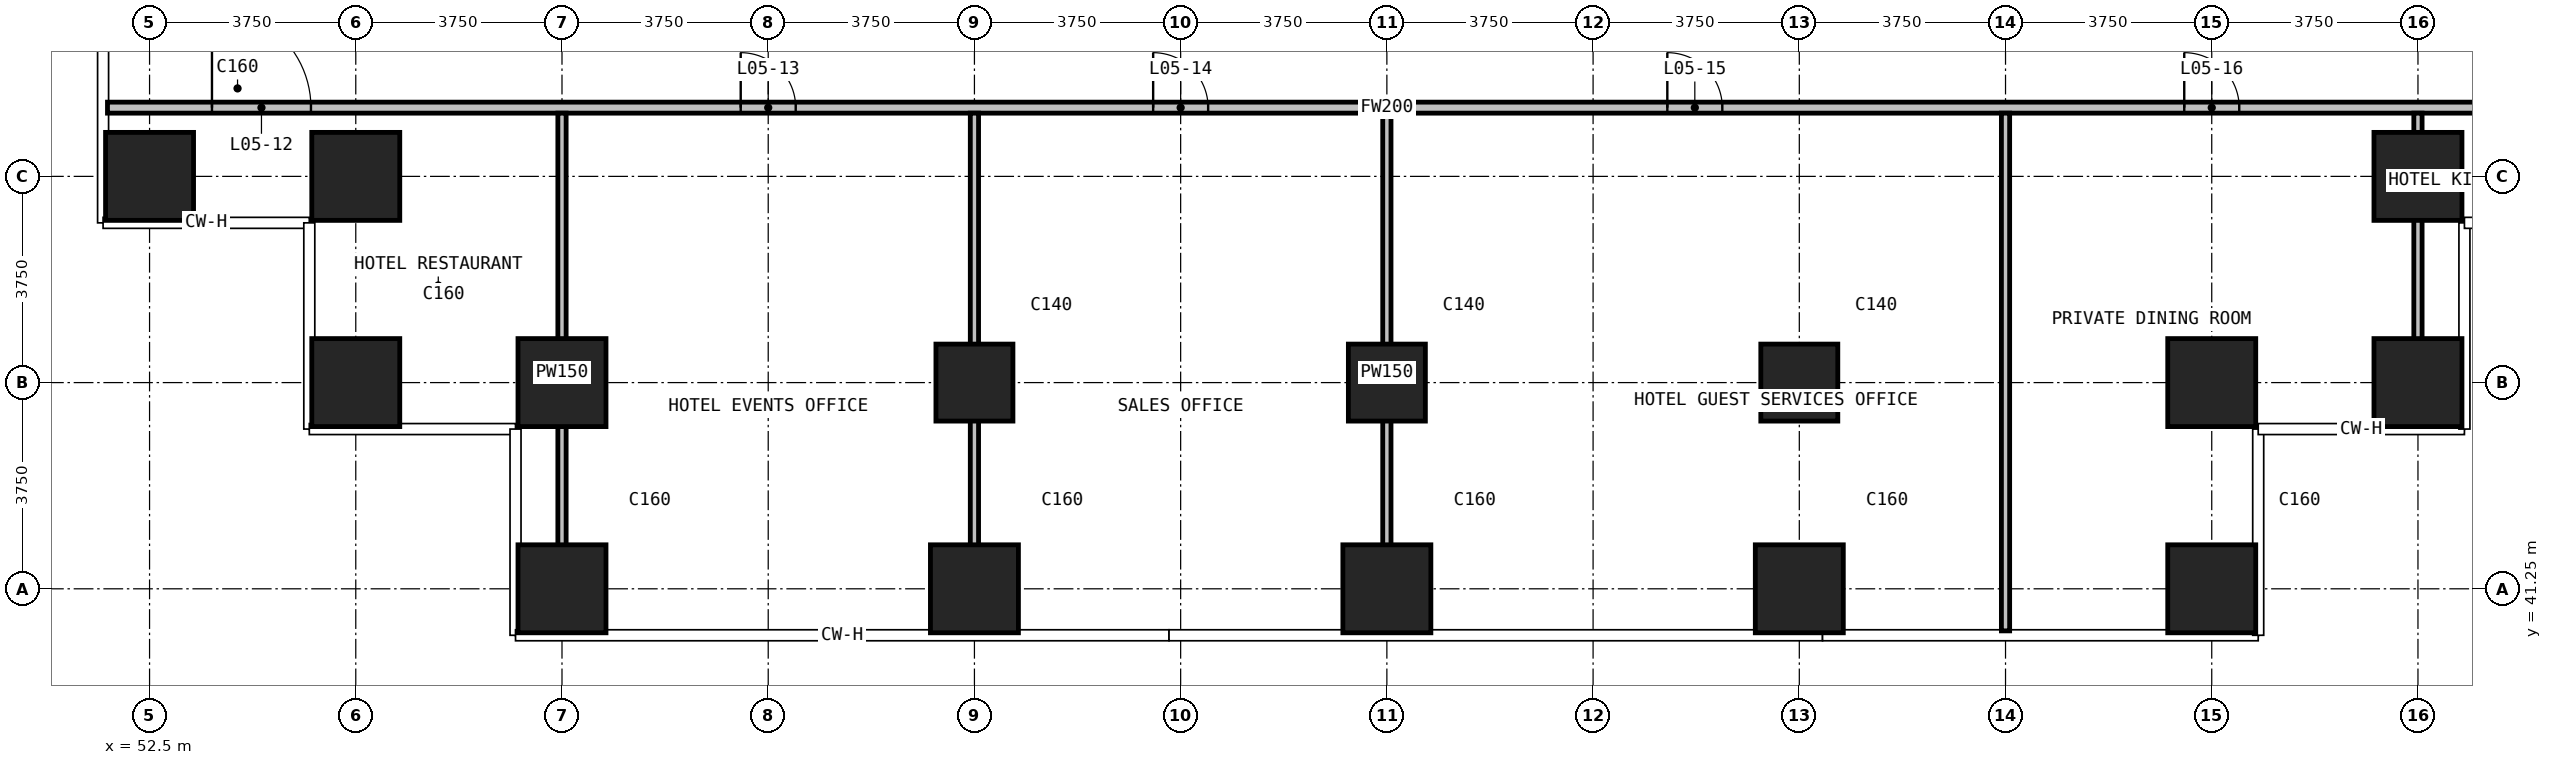
"""IFC4 building model, lengths in metres.
Left out: names, types, materials, properties, quantities, classifications, styles, units other than length and angle.
Written with IfcOpenShell. Run it as: python <this file> out.ifc"""

import sys

from ifc_helpers import new_model, si_unit, direction, frame, frame_2d, origin, origin_2d, place, context, subcontext, project, spatial, rectangle, extrude, element, fill, save


model = new_model("IFC4")
c1 = context("Model", 3, precision=1e-05, world=origin(), true_north=direction((0.0, 1.0)))
c2 = subcontext(c1, "Body", "Model", "MODEL_VIEW")
j1 = project(units=[si_unit("LENGTHUNIT", "METRE"), si_unit("PLANEANGLEUNIT", "RADIAN")], contexts=[c1])
p1 = place(None, origin())
s1 = spatial("IfcSite", under=j1, at=p1, CompositionType="ELEMENT")
p2 = place(p1, origin())
s2 = spatial("IfcBuilding", under=s1, at=p2, CompositionType="ELEMENT")
p3 = place(p2, frame((0.0, 0.0, 35.0)))
s3 = spatial("IfcBuildingStorey", under=s2, at=p3, CompositionType="ELEMENT", Elevation=35.0)
for number, where, z_axis, x_axis in (
    (1, (52.5, 48.75, 0.0), (0.0, 0.0, 1.0), (1.0, 0.0, 0.0)),
    (2, (56.25, 45.0, 0.0), (0.0, 0.0, 1.0), (1.0, 0.0, 0.0)),
    (3, (56.25, 48.75, 0.0), (0.0, 0.0, 1.0), (1.0, 0.0, 0.0)),
    (4, (60.0, 41.25, 0.0), (0.0, 0.0, 1.0), (1.0, 0.0, 0.0)),
    (5, (60.0, 45.0, 0.0), (0.0, 0.0, 1.0), (1.0, 0.0, 0.0)),
    (6, (67.5, 41.25, 0.0), (0.0, 0.0, 1.0), (1.0, 0.0, 0.0)),
):
    element("IfcColumn", number, at=place(p3, frame(where, z_axis=z_axis, x_axis=x_axis)), inside=s3, PredefinedType="COLUMN", context=c2, shape_type="SweptSolid", body=[
        extrude(rectangle(XDim=1.6, YDim=1.6, at=origin_2d()), origin(), (0.0, 0.0, 1.0), 4.5),
    ])
p4 = place(p3, frame((67.5, 45.0, 0.0), z_axis=(0.0, 0.0, 1.0), x_axis=(1.0, 0.0, 0.0)))
e7 = element("IfcColumn", 7, at=p4, inside=s3, PredefinedType="COLUMN", context=c2, shape_type="SweptSolid", body=[
    extrude(rectangle(XDim=1.4, YDim=1.4, at=origin_2d()), origin(), (0.0, 0.0, 1.0), 4.5),
])
p5 = place(p3, frame((75.0, 41.25, 0.0), z_axis=(0.0, 0.0, 1.0), x_axis=(1.0, 0.0, 0.0)))
e8 = element("IfcColumn", 8, at=p5, inside=s3, PredefinedType="COLUMN", context=c2, shape_type="SweptSolid", body=[
    extrude(rectangle(XDim=1.6, YDim=1.6, at=origin_2d()), origin(), (0.0, 0.0, 1.0), 4.5),
])
p6 = place(p3, frame((75.0, 45.0, 0.0), z_axis=(0.0, 0.0, 1.0), x_axis=(1.0, 0.0, 0.0)))
e9 = element("IfcColumn", 9, at=p6, inside=s3, PredefinedType="COLUMN", context=c2, shape_type="SweptSolid", body=[
    extrude(rectangle(XDim=1.4, YDim=1.4, at=origin_2d()), origin(), (0.0, 0.0, 1.0), 4.5),
])
p7 = place(p3, frame((82.5, 41.25, 0.0), z_axis=(0.0, 0.0, 1.0), x_axis=(1.0, 0.0, 0.0)))
e10 = element("IfcColumn", 10, at=p7, inside=s3, PredefinedType="COLUMN", context=c2, shape_type="SweptSolid", body=[
    extrude(rectangle(XDim=1.6, YDim=1.6, at=origin_2d()), origin(), (0.0, 0.0, 1.0), 4.5),
])
p8 = place(p3, frame((82.5, 45.0, 0.0), z_axis=(0.0, 0.0, 1.0), x_axis=(1.0, 0.0, 0.0)))
e11 = element("IfcColumn", 11, at=p8, inside=s3, PredefinedType="COLUMN", context=c2, shape_type="SweptSolid", body=[
    extrude(rectangle(XDim=1.4, YDim=1.4, at=origin_2d()), origin(), (0.0, 0.0, 1.0), 4.5),
])
for number, where, z_axis, x_axis in (
    (12, (90.0, 41.25, 0.0), (0.0, 0.0, 1.0), (1.0, 0.0, 0.0)),
    (13, (90.0, 45.0, 0.0), (0.0, 0.0, 1.0), (1.0, 0.0, 0.0)),
    (14, (93.75, 45.0, 0.0), (0.0, 0.0, 1.0), (1.0, 0.0, 0.0)),
    (15, (93.75, 48.75, 0.0), (0.0, 0.0, 1.0), (1.0, 0.0, 0.0)),
):
    element("IfcColumn", number, at=place(p3, frame(where, z_axis=z_axis, x_axis=x_axis)), inside=s3, PredefinedType="COLUMN", context=c2, shape_type="SweptSolid", body=[
        extrude(rectangle(XDim=1.6, YDim=1.6, at=origin_2d()), origin(), (0.0, 0.0, 1.0), 4.5),
    ])
p9 = place(p3, frame((51.735, 50.0, 0.0), z_axis=(0.0, 0.0, 1.0), x_axis=(1.0, 0.0, 0.0)))
e16 = element("IfcWall", 16, at=p9, inside=s3, PredefinedType="PARTITIONING", context=c2, shape_type="SweptSolid", body=[
    extrude(rectangle(XDim=46.53, YDim=0.2, at=frame_2d((23.265, 0.0))), origin(), (0.0, 0.0, 1.0), 4.2),
])
p10 = place(p9, frame((1.9, 0.0, 0.0)))
e17 = element("IfcOpeningElement", 17, at=p10, cuts=e16, PredefinedType="OPENING", context=c2, shape_type="SweptSolid", body=[
    extrude(rectangle(XDim=1.8, YDim=2.2, at=frame_2d((0.9, 1.1))), frame((0.0, 0.11, 0.0), z_axis=(0.0, -1.0, 0.0), x_axis=(1.0, 0.0, 0.0)), (0.0, 0.0, 1.0), 0.22),
])
p11 = place(p9, frame((11.515, 0.0, 0.0)))
e18 = element("IfcOpeningElement", 18, at=p11, cuts=e16, PredefinedType="OPENING", context=c2, shape_type="SweptSolid", body=[
    extrude(rectangle(XDim=1.0, YDim=2.2, at=frame_2d((0.5, 1.1))), frame((0.0, 0.11, 0.0), z_axis=(0.0, -1.0, 0.0), x_axis=(1.0, 0.0, 0.0)), (0.0, 0.0, 1.0), 0.22),
])
p12 = place(p9, frame((19.015, 0.0, 0.0)))
e19 = element("IfcOpeningElement", 19, at=p12, cuts=e16, PredefinedType="OPENING", context=c2, shape_type="SweptSolid", body=[
    extrude(rectangle(XDim=1.0, YDim=2.2, at=frame_2d((0.5, 1.1))), frame((0.0, 0.11, 0.0), z_axis=(0.0, -1.0, 0.0), x_axis=(1.0, 0.0, 0.0)), (0.0, 0.0, 1.0), 0.22),
])
p13 = place(p9, frame((28.365, 0.0, 0.0)))
e20 = element("IfcOpeningElement", 20, at=p13, cuts=e16, PredefinedType="OPENING", context=c2, shape_type="SweptSolid", body=[
    extrude(rectangle(XDim=1.0, YDim=2.2, at=frame_2d((0.5, 1.1))), frame((0.0, 0.11, 0.0), z_axis=(0.0, -1.0, 0.0), x_axis=(1.0, 0.0, 0.0)), (0.0, 0.0, 1.0), 0.22),
])
p14 = place(p9, frame((37.765, 0.0, 0.0)))
e21 = element("IfcOpeningElement", 21, at=p14, cuts=e16, PredefinedType="OPENING", context=c2, shape_type="SweptSolid", body=[
    extrude(rectangle(XDim=1.0, YDim=2.2, at=frame_2d((0.5, 1.1))), frame((0.0, 0.11, 0.0), z_axis=(0.0, -1.0, 0.0), x_axis=(1.0, 0.0, 0.0)), (0.0, 0.0, 1.0), 0.22),
])
p15 = place(p9, frame((43.815, 0.0, 0.0)))
e22 = element("IfcOpeningElement", 22, at=p15, cuts=e16, PredefinedType="OPENING", context=c2, shape_type="SweptSolid", body=[
    extrude(rectangle(XDim=0.9, YDim=2.2, at=frame_2d((0.45, 1.1))), frame((0.0, 0.11, 0.0), z_axis=(0.0, -1.0, 0.0), x_axis=(1.0, 0.0, 0.0)), (0.0, 0.0, 1.0), 0.22),
])
for number, where, z_axis, x_axis in (
    (23, (60.0, 40.485, 0.0), (0.0, 0.0, 1.0), (0.0, 1.0, 0.0)),
    (24, (67.5, 40.485, 0.0), (0.0, 0.0, 1.0), (0.0, 1.0, 0.0)),
    (25, (75.0, 40.485, 0.0), (0.0, 0.0, 1.0), (0.0, 1.0, 0.0)),
    (26, (86.25, 40.485, 0.0), (0.0, 0.0, 1.0), (0.0, 1.0, 0.0)),
):
    element("IfcWall", number, at=place(p3, frame(where, z_axis=z_axis, x_axis=x_axis)), inside=s3, PredefinedType="PARTITIONING", context=c2, shape_type="SweptSolid", body=[
        extrude(rectangle(XDim=9.415, YDim=0.15, at=frame_2d((4.708, 0.0))), origin(), (0.0, 0.0, 1.0), 4.2),
    ])
p16 = place(p3, frame((93.75, 44.235, 0.0), z_axis=(0.0, 0.0, 1.0), x_axis=(0.0, 1.0, 0.0)))
e27 = element("IfcWall", 27, at=p16, inside=s3, PredefinedType="PARTITIONING", context=c2, shape_type="SweptSolid", body=[
    extrude(rectangle(XDim=5.665, YDim=0.15, at=frame_2d((2.833, 0.0))), origin(), (0.0, 0.0, 1.0), 4.2),
])
p17 = place(p10, origin())
e28 = element("IfcDoor", 28, at=p17, inside=s3, OperationType="DOUBLE_DOOR_SINGLE_SWING", PredefinedType="DOOR", context=c2, shape_type="SweptSolid", body=[
    extrude(rectangle(XDim=1.8, YDim=2.2, at=frame_2d((0.9, 1.1))), frame((0.0, 0.025, 0.0), z_axis=(0.0, -1.0, 0.0), x_axis=(1.0, 0.0, 0.0)), (0.0, 0.0, 1.0), 0.05),
])
fill(e17, e28)
p18 = place(p11, origin())
e29 = element("IfcDoor", 29, at=p18, inside=s3, OperationType="SINGLE_SWING_RIGHT", PredefinedType="DOOR", context=c2, shape_type="SweptSolid", body=[
    extrude(rectangle(XDim=1.0, YDim=2.2, at=frame_2d((0.5, 1.1))), frame((0.0, 0.025, 0.0), z_axis=(0.0, -1.0, 0.0), x_axis=(1.0, 0.0, 0.0)), (0.0, 0.0, 1.0), 0.05),
])
fill(e18, e29)
p19 = place(p12, origin())
e30 = element("IfcDoor", 30, at=p19, inside=s3, OperationType="SINGLE_SWING_RIGHT", PredefinedType="DOOR", context=c2, shape_type="SweptSolid", body=[
    extrude(rectangle(XDim=1.0, YDim=2.2, at=frame_2d((0.5, 1.1))), frame((0.0, 0.025, 0.0), z_axis=(0.0, -1.0, 0.0), x_axis=(1.0, 0.0, 0.0)), (0.0, 0.0, 1.0), 0.05),
])
fill(e19, e30)
p20 = place(p13, origin())
e31 = element("IfcDoor", 31, at=p20, inside=s3, OperationType="SINGLE_SWING_LEFT", PredefinedType="DOOR", context=c2, shape_type="SweptSolid", body=[
    extrude(rectangle(XDim=1.0, YDim=2.2, at=frame_2d((0.5, 1.1))), frame((0.0, 0.025, 0.0), z_axis=(0.0, -1.0, 0.0), x_axis=(1.0, 0.0, 0.0)), (0.0, 0.0, 1.0), 0.05),
])
fill(e20, e31)
p21 = place(p14, origin())
e32 = element("IfcDoor", 32, at=p21, inside=s3, OperationType="SINGLE_SWING_RIGHT", PredefinedType="DOOR", context=c2, shape_type="SweptSolid", body=[
    extrude(rectangle(XDim=1.0, YDim=2.2, at=frame_2d((0.5, 1.1))), frame((0.0, 0.025, 0.0), z_axis=(0.0, -1.0, 0.0), x_axis=(1.0, 0.0, 0.0)), (0.0, 0.0, 1.0), 0.05),
])
fill(e21, e32)
save(model, sys.argv[1])
